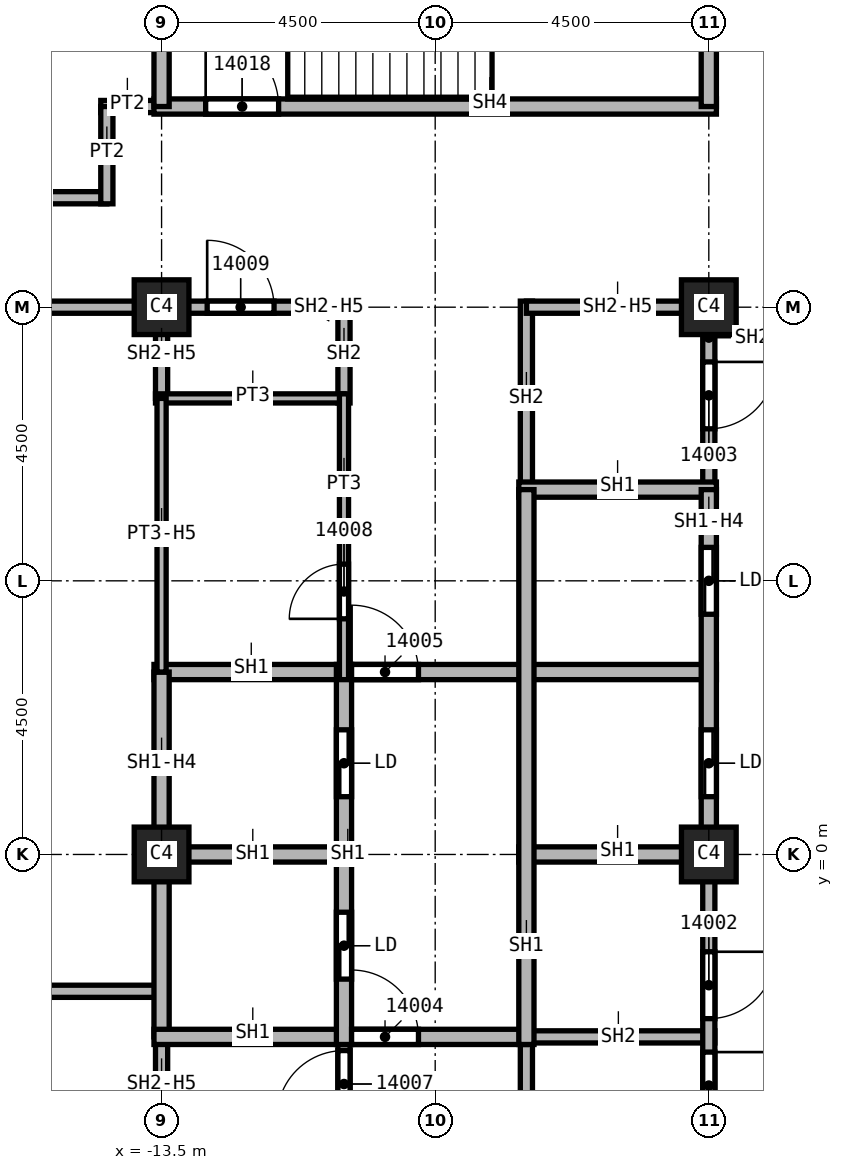
"""IFC4 building model, lengths in metres.
Left out: names, types, materials, properties, quantities, classifications, styles, units other than length and angle.
Written with IfcOpenShell. Run it as: python <this file> out.ifc"""

import sys

from ifc_helpers import new_model, si_unit, direction, frame, frame_2d, origin, origin_2d, place, context, subcontext, project, spatial, rectangle, extrude, element, fill, save


model = new_model("IFC4")
c1 = context("Model", 3, precision=1e-05, world=origin(), true_north=direction((0.0, 1.0)))
c2 = subcontext(c1, "Body", "Model", "MODEL_VIEW")
j1 = project(units=[si_unit("LENGTHUNIT", "METRE"), si_unit("PLANEANGLEUNIT", "RADIAN")], contexts=[c1])
p1 = place(None, origin())
s1 = spatial("IfcSite", under=j1, at=p1, CompositionType="ELEMENT")
p2 = place(p1, origin())
s2 = spatial("IfcBuilding", under=s1, at=p2, CompositionType="ELEMENT")
p3 = place(p2, frame((0.0, 0.0, 224.0)))
s3 = spatial("IfcBuildingStorey", under=s2, at=p3, CompositionType="ELEMENT", Elevation=224.0)
for number, where, z_axis, x_axis in (
    (1, (-4.5, 0.0, 0.0), (0.0, 0.0, 1.0), (1.0, 0.0, 0.0)),
    (2, (-4.5, 9.0, 0.0), (0.0, 0.0, 1.0), (1.0, 0.0, 0.0)),
    (3, (-13.5, 0.0, 0.0), (0.0, 0.0, 1.0), (1.0, 0.0, 0.0)),
    (4, (-13.5, 9.0, 0.0), (0.0, 0.0, 1.0), (1.0, 0.0, 0.0)),
):
    element("IfcColumn", number, at=place(p3, frame(where, z_axis=z_axis, x_axis=x_axis)), inside=s3, PredefinedType="COLUMN", context=c2, shape_type="SweptSolid", body=[
        extrude(rectangle(XDim=0.9, YDim=0.9, at=origin_2d()), origin(), (0.0, 0.0, 1.0), 3.72),
    ])
p4 = place(p3, frame((-18.0, -2.25, 0.0), z_axis=(0.0, 0.0, 1.0), x_axis=(1.0, 0.0, 0.0)))
e5 = element("IfcWall", 5, at=p4, inside=s3, PredefinedType="PARTITIONING", context=c2, shape_type="SweptSolid", body=[
    extrude(rectangle(XDim=4.5, YDim=0.2, at=frame_2d((2.25, 0.0))), origin(), (0.0, 0.0, 1.0), 3.72),
])
p5 = place(p3, frame((-18.0, 10.8, 0.0), z_axis=(0.0, 0.0, 1.0), x_axis=(1.0, 0.0, 0.0)))
e6 = element("IfcWall", 6, at=p5, inside=s3, PredefinedType="PARTITIONING", context=c2, shape_type="SweptSolid", body=[
    extrude(rectangle(XDim=3.6, YDim=0.2, at=frame_2d((1.8, 0.0))), origin(), (0.0, 0.0, 1.0), 3.72),
])
p6 = place(p5, frame((0.25, 0.0, 0.0)))
e7 = element("IfcOpeningElement", 7, at=p6, cuts=e6, PredefinedType="OPENING", context=c2, shape_type="SweptSolid", body=[
    extrude(rectangle(XDim=1.0, YDim=2.1, at=frame_2d((0.5, 1.05))), frame((0.0, 0.1, 0.0), z_axis=(0.0, -1.0, 0.0), x_axis=(1.0, 0.0, 0.0)), (0.0, 0.0, 1.0), 0.2),
])
p7 = place(p3, frame((-14.5, 12.3, 0.0), z_axis=(0.0, 0.0, 1.0), x_axis=(1.0, 0.0, 0.0)))
e8 = element("IfcWall", 8, at=p7, inside=s3, PredefinedType="PARTITIONING", context=c2, shape_type="SweptSolid", body=[
    extrude(rectangle(XDim=1.125, YDim=0.2, at=frame_2d((0.562, 0.0))), origin(), (0.0, 0.0, 1.0), 3.72),
])
p8 = place(p3, frame((-13.5, 9.0, 0.0), z_axis=(0.0, 0.0, 1.0), x_axis=(-1.0, 0.0, 0.0)))
e9 = element("IfcWall", 9, at=p8, inside=s3, PredefinedType="PARTITIONING", context=c2, shape_type="SweptSolid", body=[
    extrude(rectangle(XDim=4.5, YDim=0.2, at=frame_2d((2.25, 0.0))), origin(), (0.0, 0.0, 1.0), 3.72),
])
p9 = place(p3, frame((-14.4, 10.7, 0.0), z_axis=(0.0, 0.0, 1.0), x_axis=(0.0, 1.0, 0.0)))
e10 = element("IfcWall", 10, at=p9, inside=s3, PredefinedType="PARTITIONING", context=c2, shape_type="SweptSolid", body=[
    extrude(rectangle(XDim=1.6, YDim=0.2, at=frame_2d((0.8, 0.0))), origin(), (0.0, 0.0, 1.0), 3.72),
])
p10 = place(p3, frame((-13.6, 9.0, 0.0), z_axis=(0.0, 0.0, 1.0), x_axis=(1.0, 0.0, 0.0)))
e11 = element("IfcWall", 11, at=p10, inside=s3, PredefinedType="SOLIDWALL", context=c2, shape_type="SweptSolid", body=[
    extrude(rectangle(XDim=3.1, YDim=0.2, at=frame_2d((1.55, 0.0))), origin(), (0.0, 0.0, 1.0), 2.958),
])
p11 = place(p10, frame((0.85, 0.0, 0.0)))
e12 = element("IfcOpeningElement", 12, at=p11, cuts=e11, PredefinedType="OPENING", context=c2, shape_type="SweptSolid", body=[
    extrude(rectangle(XDim=1.1, YDim=2.1, at=frame_2d((0.55, 1.05))), frame((0.0, 0.1, 0.0), z_axis=(0.0, -1.0, 0.0), x_axis=(1.0, 0.0, 0.0)), (0.0, 0.0, 1.0), 0.2),
])
p12 = place(p3, frame((-13.5, -4.5, 0.0), z_axis=(0.0, 0.0, 1.0), x_axis=(0.0, 1.0, 0.0)))
e13 = element("IfcWall", 13, at=p12, inside=s3, PredefinedType="SOLIDWALL", context=c2, shape_type="SweptSolid", body=[
    extrude(rectangle(XDim=1.5, YDim=0.2, at=frame_2d((0.75, 0.0))), origin(), (0.0, 0.0, 1.0), 2.958),
])
p13 = place(p3, frame((-13.5, 7.5, 0.0), z_axis=(0.0, 0.0, 1.0), x_axis=(0.0, 1.0, 0.0)))
e14 = element("IfcWall", 14, at=p13, inside=s3, PredefinedType="SOLIDWALL", context=c2, shape_type="SweptSolid", body=[
    extrude(rectangle(XDim=1.6, YDim=0.2, at=frame_2d((0.8, 0.0))), origin(), (0.0, 0.0, 1.0), 2.958),
])
p14 = place(p3, frame((-10.5, -4.575, 0.0), z_axis=(0.0, 0.0, 1.0), x_axis=(0.0, 1.0, 0.0)))
e15 = element("IfcWall", 15, at=p14, inside=s3, PredefinedType="SOLIDWALL", context=c2, shape_type="SweptSolid", body=[
    extrude(rectangle(XDim=1.7, YDim=0.2, at=frame_2d((0.85, 0.0))), origin(), (0.0, 0.0, 1.0), 3.72),
])
p15 = place(p14, frame((0.25, 0.0, 0.0)))
e16 = element("IfcOpeningElement", 16, at=p15, cuts=e15, PredefinedType="OPENING", context=c2, shape_type="SweptSolid", body=[
    extrude(rectangle(XDim=1.1, YDim=2.1, at=frame_2d((0.55, 1.05))), frame((0.0, 0.1, 0.0), z_axis=(0.0, -1.0, 0.0), x_axis=(1.0, 0.0, 0.0)), (0.0, 0.0, 1.0), 0.2),
])
p16 = place(p3, frame((-10.5, 7.425, 0.0), z_axis=(0.0, 0.0, 1.0), x_axis=(0.0, 1.0, 0.0)))
e17 = element("IfcWall", 17, at=p16, inside=s3, PredefinedType="SOLIDWALL", context=c2, shape_type="SweptSolid", body=[
    extrude(rectangle(XDim=1.675, YDim=0.2, at=frame_2d((0.837, 0.0))), origin(), (0.0, 0.0, 1.0), 3.72),
])
p17 = place(p3, frame((-7.625, -3.0, 0.0), z_axis=(0.0, 0.0, 1.0), x_axis=(1.0, 0.0, 0.0)))
e18 = element("IfcWall", 18, at=p17, inside=s3, PredefinedType="SOLIDWALL", context=c2, shape_type="SweptSolid", body=[
    extrude(rectangle(XDim=3.225, YDim=0.2, at=frame_2d((1.613, 0.0))), origin(), (0.0, 0.0, 1.0), 3.72),
])
p18 = place(p3, frame((-7.5, -9.1, 0.0), z_axis=(0.0, 0.0, 1.0), x_axis=(0.0, 1.0, 0.0)))
e19 = element("IfcWall", 19, at=p18, inside=s3, PredefinedType="SOLIDWALL", context=c2, shape_type="SweptSolid", body=[
    extrude(rectangle(XDim=6.225, YDim=0.2, at=frame_2d((3.113, 0.0))), origin(), (0.0, 0.0, 1.0), 3.72),
])
p19 = place(p3, frame((-7.5, 6.0, 0.0), z_axis=(0.0, 0.0, 1.0), x_axis=(0.0, 1.0, 0.0)))
e20 = element("IfcWall", 20, at=p19, inside=s3, PredefinedType="SOLIDWALL", context=c2, shape_type="SweptSolid", body=[
    extrude(rectangle(XDim=3.1, YDim=0.2, at=frame_2d((1.55, 0.0))), origin(), (0.0, 0.0, 1.0), 3.72),
])
p20 = place(p3, frame((-7.5, 9.0, 0.0), z_axis=(0.0, 0.0, 1.0), x_axis=(1.0, 0.0, 0.0)))
e21 = element("IfcWall", 21, at=p20, inside=s3, PredefinedType="SOLIDWALL", context=c2, shape_type="SweptSolid", body=[
    extrude(rectangle(XDim=3.0, YDim=0.2, at=frame_2d((1.5, 0.0))), origin(), (0.0, 0.0, 1.0), 2.958),
])
p21 = place(p3, frame((-4.5, 0.0, 0.0), z_axis=(0.0, 0.0, 1.0), x_axis=(0.0, -1.0, 0.0)))
e22 = element("IfcWall", 22, at=p21, inside=s3, PredefinedType="SOLIDWALL", context=c2, shape_type="SweptSolid", body=[
    extrude(rectangle(XDim=9.1, YDim=0.2, at=frame_2d((4.55, 0.0))), origin(), (0.0, 0.0, 1.0), 2.958),
])
p22 = place(p21, frame((3.25, 0.0, 0.0)))
e23 = element("IfcOpeningElement", 23, at=p22, cuts=e22, PredefinedType="OPENING", context=c2, shape_type="SweptSolid", body=[
    extrude(rectangle(XDim=1.1, YDim=2.1, at=frame_2d((0.55, 1.05))), frame((0.0, 0.1, 0.0), z_axis=(0.0, -1.0, 0.0), x_axis=(1.0, 0.0, 0.0)), (0.0, 0.0, 1.0), 0.2),
])
p23 = place(p21, frame((1.6, 0.0, 0.0)))
e24 = element("IfcOpeningElement", 24, at=p23, cuts=e22, PredefinedType="OPENING", context=c2, shape_type="SweptSolid", body=[
    extrude(rectangle(XDim=1.1, YDim=2.1, at=frame_2d((0.55, 1.05))), frame((0.0, 0.1, 0.0), z_axis=(0.0, -1.0, 0.0), x_axis=(1.0, 0.0, 0.0)), (0.0, 0.0, 1.0), 0.2),
])
p24 = place(p3, frame((-4.5, 9.1, 0.0), z_axis=(0.0, 0.0, 1.0), x_axis=(0.0, -1.0, 0.0)))
e25 = element("IfcWall", 25, at=p24, inside=s3, PredefinedType="SOLIDWALL", context=c2, shape_type="SweptSolid", body=[
    extrude(rectangle(XDim=3.1, YDim=0.2, at=frame_2d((1.55, 0.0))), origin(), (0.0, 0.0, 1.0), 2.958),
])
p25 = place(p24, frame((1.0, 0.0, 0.0)))
e26 = element("IfcOpeningElement", 26, at=p25, cuts=e25, PredefinedType="OPENING", context=c2, shape_type="SweptSolid", body=[
    extrude(rectangle(XDim=1.1, YDim=2.1, at=frame_2d((0.55, 1.05))), frame((0.0, 0.1, 0.0), z_axis=(0.0, -1.0, 0.0), x_axis=(1.0, 0.0, 0.0)), (0.0, 0.0, 1.0), 0.2),
])
p26 = place(p3, frame((-13.625, 0.0, 0.0), z_axis=(0.0, 0.0, 1.0), x_axis=(1.0, 0.0, 0.0)))
e27 = element("IfcWall", 27, at=p26, inside=s3, PredefinedType="SOLIDWALL", context=c2, shape_type="SweptSolid", body=[
    extrude(rectangle(XDim=3.125, YDim=0.25, at=frame_2d((1.562, 0.0))), origin(), (0.0, 0.0, 1.0), 3.72),
])
p27 = place(p3, frame((-13.625, 3.0, 0.0), z_axis=(0.0, 0.0, 1.0), x_axis=(1.0, 0.0, 0.0)))
e28 = element("IfcWall", 28, at=p27, inside=s3, PredefinedType="SOLIDWALL", context=c2, shape_type="SweptSolid", body=[
    extrude(rectangle(XDim=9.25, YDim=0.25, at=frame_2d((4.625, 0.0))), origin(), (0.0, 0.0, 1.0), 3.72),
])
p28 = place(p27, frame((3.25, 0.0, 0.0)))
e29 = element("IfcOpeningElement", 29, at=p28, cuts=e28, PredefinedType="OPENING", context=c2, shape_type="SweptSolid", body=[
    extrude(rectangle(XDim=1.1, YDim=2.1, at=frame_2d((0.55, 1.05))), frame((0.0, 0.125, 0.0), z_axis=(0.0, -1.0, 0.0), x_axis=(1.0, 0.0, 0.0)), (0.0, 0.0, 1.0), 0.25),
])
p29 = place(p3, frame((-13.5, -3.0, 0.0), z_axis=(0.0, 0.0, 1.0), x_axis=(0.0, 1.0, 0.0)))
e30 = element("IfcWall", 30, at=p29, inside=s3, PredefinedType="SOLIDWALL", context=c2, shape_type="SweptSolid", body=[
    extrude(rectangle(XDim=6.0, YDim=0.25, at=frame_2d((3.0, 0.0))), origin(), (0.0, 0.0, 1.0), 2.958),
])
p30 = place(p3, frame((-13.625, -3.0, 0.0), z_axis=(0.0, 0.0, 1.0), x_axis=(1.0, 0.0, 0.0)))
e31 = element("IfcWall", 31, at=p30, inside=s3, PredefinedType="SOLIDWALL", context=c2, shape_type="SweptSolid", body=[
    extrude(rectangle(XDim=6.125, YDim=0.25, at=frame_2d((3.062, 0.0))), origin(), (0.0, 0.0, 1.0), 3.72),
])
p31 = place(p30, frame((3.25, 0.0, 0.0)))
e32 = element("IfcOpeningElement", 32, at=p31, cuts=e31, PredefinedType="OPENING", context=c2, shape_type="SweptSolid", body=[
    extrude(rectangle(XDim=1.1, YDim=2.1, at=frame_2d((0.55, 1.05))), frame((0.0, 0.125, 0.0), z_axis=(0.0, -1.0, 0.0), x_axis=(1.0, 0.0, 0.0)), (0.0, 0.0, 1.0), 0.25),
])
p32 = place(p3, frame((-10.5, -3.125, 0.0), z_axis=(0.0, 0.0, 1.0), x_axis=(0.0, 1.0, 0.0)))
e33 = element("IfcWall", 33, at=p32, inside=s3, PredefinedType="SOLIDWALL", context=c2, shape_type="SweptSolid", body=[
    extrude(rectangle(XDim=6.25, YDim=0.25, at=frame_2d((3.125, 0.0))), origin(), (0.0, 0.0, 1.0), 3.72),
])
p33 = place(p32, frame((1.075, 0.0, 0.0)))
e34 = element("IfcOpeningElement", 34, at=p33, cuts=e33, PredefinedType="OPENING", context=c2, shape_type="SweptSolid", body=[
    extrude(rectangle(XDim=1.1, YDim=2.1, at=frame_2d((0.55, 1.05))), frame((0.0, 0.125, 0.0), z_axis=(0.0, -1.0, 0.0), x_axis=(1.0, 0.0, 0.0)), (0.0, 0.0, 1.0), 0.25),
])
p34 = place(p32, frame((4.075, 0.0, 0.0)))
e35 = element("IfcOpeningElement", 35, at=p34, cuts=e33, PredefinedType="OPENING", context=c2, shape_type="SweptSolid", body=[
    extrude(rectangle(XDim=1.1, YDim=2.1, at=frame_2d((0.55, 1.05))), frame((0.0, 0.125, 0.0), z_axis=(0.0, -1.0, 0.0), x_axis=(1.0, 0.0, 0.0)), (0.0, 0.0, 1.0), 0.25),
])
for number, where, z_axis, x_axis in (
    (36, (-7.625, 0.0, 0.0), (0.0, 0.0, 1.0), (1.0, 0.0, 0.0)),
    (37, (-7.625, 6.0, 0.0), (0.0, 0.0, 1.0), (1.0, 0.0, 0.0)),
):
    element("IfcWall", number, at=place(p3, frame(where, z_axis=z_axis, x_axis=x_axis)), inside=s3, PredefinedType="SOLIDWALL", context=c2, shape_type="SweptSolid", body=[
        extrude(rectangle(XDim=3.25, YDim=0.25, at=frame_2d((1.625, 0.0))), origin(), (0.0, 0.0, 1.0), 3.72),
    ])
p35 = place(p3, frame((-7.5, -3.125, 0.0), z_axis=(0.0, 0.0, 1.0), x_axis=(0.0, 1.0, 0.0)))
e38 = element("IfcWall", 38, at=p35, inside=s3, PredefinedType="SOLIDWALL", context=c2, shape_type="SweptSolid", body=[
    extrude(rectangle(XDim=9.125, YDim=0.25, at=frame_2d((4.562, 0.0))), origin(), (0.0, 0.0, 1.0), 3.72),
])
p36 = place(p3, frame((-4.5, 6.0, 0.0), z_axis=(0.0, 0.0, 1.0), x_axis=(0.0, -1.0, 0.0)))
e39 = element("IfcWall", 39, at=p36, inside=s3, PredefinedType="SOLIDWALL", context=c2, shape_type="SweptSolid", body=[
    extrude(rectangle(XDim=6.0, YDim=0.25, at=frame_2d((3.0, 0.0))), origin(), (0.0, 0.0, 1.0), 2.958),
])
p37 = place(p36, frame((3.95, 0.0, 0.0)))
e40 = element("IfcOpeningElement", 40, at=p37, cuts=e39, PredefinedType="OPENING", context=c2, shape_type="SweptSolid", body=[
    extrude(rectangle(XDim=1.1, YDim=2.1, at=frame_2d((0.55, 1.05))), frame((0.0, 0.125, 0.0), z_axis=(0.0, -1.0, 0.0), x_axis=(1.0, 0.0, 0.0)), (0.0, 0.0, 1.0), 0.25),
])
p38 = place(p36, frame((0.95, 0.0, 0.0)))
e41 = element("IfcOpeningElement", 41, at=p38, cuts=e39, PredefinedType="OPENING", context=c2, shape_type="SweptSolid", body=[
    extrude(rectangle(XDim=1.1, YDim=2.1, at=frame_2d((0.55, 1.05))), frame((0.0, 0.125, 0.0), z_axis=(0.0, -1.0, 0.0), x_axis=(1.0, 0.0, 0.0)), (0.0, 0.0, 1.0), 0.25),
])
p39 = place(p3, frame((-13.625, 12.3, 0.0), z_axis=(0.0, 0.0, 1.0), x_axis=(1.0, 0.0, 0.0)))
e42 = element("IfcWall", 42, at=p39, inside=s3, PredefinedType="SOLIDWALL", context=c2, shape_type="SweptSolid", body=[
    extrude(rectangle(XDim=9.25, YDim=0.25, at=frame_2d((4.625, 0.0))), origin(), (0.0, 0.0, 1.0), 3.72),
])
p40 = place(p39, frame((0.85, 0.0, 0.0)))
e43 = element("IfcOpeningElement", 43, at=p40, cuts=e42, PredefinedType="OPENING", context=c2, shape_type="SweptSolid", body=[
    extrude(rectangle(XDim=1.2, YDim=2.1, at=frame_2d((0.6, 1.05))), frame((0.0, 0.125, 0.0), z_axis=(0.0, -1.0, 0.0), x_axis=(1.0, 0.0, 0.0)), (0.0, 0.0, 1.0), 0.25),
])
for number, where, z_axis, x_axis in (
    (44, (-13.5, 12.3, 0.0), (0.0, 0.0, 1.0), (0.0, 1.0, 0.0)),
    (45, (-4.5, 16.8, 0.0), (0.0, 0.0, 1.0), (0.0, -1.0, 0.0)),
):
    element("IfcWall", number, at=place(p3, frame(where, z_axis=z_axis, x_axis=x_axis)), inside=s3, PredefinedType="SOLIDWALL", context=c2, shape_type="SweptSolid", body=[
        extrude(rectangle(XDim=4.5, YDim=0.25, at=frame_2d((2.25, 0.0))), origin(), (0.0, 0.0, 1.0), 3.72),
    ])
p41 = place(p3, frame((-13.6, 7.5, 0.0), z_axis=(0.0, 0.0, 1.0), x_axis=(1.0, 0.0, 0.0)))
e46 = element("IfcWall", 46, at=p41, inside=s3, PredefinedType="PARTITIONING", context=c2, shape_type="SweptSolid", body=[
    extrude(rectangle(XDim=3.1, YDim=0.15, at=frame_2d((1.55, 0.0))), origin(), (0.0, 0.0, 1.0), 3.72),
])
p42 = place(p3, frame((-13.5, 3.0, 0.0), z_axis=(0.0, 0.0, 1.0), x_axis=(0.0, 1.0, 0.0)))
e47 = element("IfcWall", 47, at=p42, inside=s3, PredefinedType="PARTITIONING", context=c2, shape_type="SweptSolid", body=[
    extrude(rectangle(XDim=4.5, YDim=0.15, at=frame_2d((2.25, 0.0))), origin(), (0.0, 0.0, 1.0), 2.958),
])
p43 = place(p3, frame((-10.5, 2.875, 0.0), z_axis=(0.0, 0.0, 1.0), x_axis=(0.0, 1.0, 0.0)))
e48 = element("IfcWall", 48, at=p43, inside=s3, PredefinedType="PARTITIONING", context=c2, shape_type="SweptSolid", body=[
    extrude(rectangle(XDim=4.7, YDim=0.15, at=frame_2d((2.35, 0.0))), origin(), (0.0, 0.0, 1.0), 3.72),
])
p44 = place(p43, frame((1.0, 0.0, 0.0)))
e49 = element("IfcOpeningElement", 49, at=p44, cuts=e48, PredefinedType="OPENING", context=c2, shape_type="SweptSolid", body=[
    extrude(rectangle(XDim=0.9, YDim=2.1, at=frame_2d((0.45, 1.05))), frame((0.0, 0.075, 0.0), z_axis=(0.0, -1.0, 0.0), x_axis=(1.0, 0.0, 0.0)), (0.0, 0.0, 1.0), 0.15),
])
p45 = place(p22, origin())
e50 = element("IfcDoor", 50, at=p45, inside=s3, OperationType="SINGLE_SWING_RIGHT", PredefinedType="DOOR", context=c2, shape_type="SweptSolid", body=[
    extrude(rectangle(XDim=1.1, YDim=2.1, at=frame_2d((0.55, 1.05))), frame((0.0, 0.025, 0.0), z_axis=(0.0, -1.0, 0.0), x_axis=(1.0, 0.0, 0.0)), (0.0, 0.0, 1.0), 0.05),
])
fill(e23, e50)
p46 = place(p23, origin())
e51 = element("IfcDoor", 51, at=p46, inside=s3, OperationType="SINGLE_SWING_LEFT", PredefinedType="DOOR", context=c2, shape_type="SweptSolid", body=[
    extrude(rectangle(XDim=1.1, YDim=2.1, at=frame_2d((0.55, 1.05))), frame((0.0, 0.025, 0.0), z_axis=(0.0, -1.0, 0.0), x_axis=(1.0, 0.0, 0.0)), (0.0, 0.0, 1.0), 0.05),
])
fill(e24, e51)
p47 = place(p25, origin())
e52 = element("IfcDoor", 52, at=p47, inside=s3, OperationType="SINGLE_SWING_RIGHT", PredefinedType="DOOR", context=c2, shape_type="SweptSolid", body=[
    extrude(rectangle(XDim=1.1, YDim=2.1, at=frame_2d((0.55, 1.05))), frame((0.0, 0.025, 0.0), z_axis=(0.0, -1.0, 0.0), x_axis=(1.0, 0.0, 0.0)), (0.0, 0.0, 1.0), 0.05),
])
fill(e26, e52)
p48 = place(p31, origin())
e53 = element("IfcDoor", 53, at=p48, inside=s3, OperationType="SINGLE_SWING_LEFT", PredefinedType="DOOR", context=c2, shape_type="SweptSolid", body=[
    extrude(rectangle(XDim=1.1, YDim=2.1, at=frame_2d((0.55, 1.05))), frame((0.0, 0.025, 0.0), z_axis=(0.0, -1.0, 0.0), x_axis=(1.0, 0.0, 0.0)), (0.0, 0.0, 1.0), 0.05),
])
fill(e32, e53)
p49 = place(p28, origin())
e54 = element("IfcDoor", 54, at=p49, inside=s3, OperationType="SINGLE_SWING_RIGHT", PredefinedType="DOOR", context=c2, shape_type="SweptSolid", body=[
    extrude(rectangle(XDim=1.1, YDim=2.1, at=frame_2d((0.55, 1.05))), frame((0.0, 0.025, 0.0), z_axis=(0.0, -1.0, 0.0), x_axis=(1.0, 0.0, 0.0)), (0.0, 0.0, 1.0), 0.05),
])
fill(e29, e54)
p50 = place(p15, origin())
e55 = element("IfcDoor", 55, at=p50, inside=s3, OperationType="SINGLE_SWING_RIGHT", PredefinedType="DOOR", context=c2, shape_type="SweptSolid", body=[
    extrude(rectangle(XDim=1.1, YDim=2.1, at=frame_2d((0.55, 1.05))), frame((0.0, 0.025, 0.0), z_axis=(0.0, -1.0, 0.0), x_axis=(1.0, 0.0, 0.0)), (0.0, 0.0, 1.0), 0.05),
])
fill(e16, e55)
p51 = place(p44, origin())
e56 = element("IfcDoor", 56, at=p51, inside=s3, OperationType="SINGLE_SWING_LEFT", PredefinedType="DOOR", context=c2, shape_type="SweptSolid", body=[
    extrude(rectangle(XDim=0.9, YDim=2.1, at=frame_2d((0.45, 1.05))), frame((0.0, 0.025, 0.0), z_axis=(0.0, -1.0, 0.0), x_axis=(1.0, 0.0, 0.0)), (0.0, 0.0, 1.0), 0.05),
])
fill(e49, e56)
p52 = place(p11, origin())
e57 = element("IfcDoor", 57, at=p52, inside=s3, OperationType="SINGLE_SWING_RIGHT", PredefinedType="DOOR", context=c2, shape_type="SweptSolid", body=[
    extrude(rectangle(XDim=1.1, YDim=2.1, at=frame_2d((0.55, 1.05))), frame((0.0, 0.025, 0.0), z_axis=(0.0, -1.0, 0.0), x_axis=(1.0, 0.0, 0.0)), (0.0, 0.0, 1.0), 0.05),
])
fill(e12, e57)
p53 = place(p40, origin())
e58 = element("IfcDoor", 58, at=p53, inside=s3, OperationType="SINGLE_SWING_LEFT", PredefinedType="DOOR", context=c2, shape_type="SweptSolid", body=[
    extrude(rectangle(XDim=1.2, YDim=2.1, at=frame_2d((0.6, 1.05))), frame((0.0, 0.025, 0.0), z_axis=(0.0, -1.0, 0.0), x_axis=(1.0, 0.0, 0.0)), (0.0, 0.0, 1.0), 0.05),
])
fill(e43, e58)
p54 = place(p37, origin())
e59 = element("IfcDoor", 59, at=p54, inside=s3, OperationType="SLIDING_TO_LEFT", PredefinedType="DOOR", context=c2, shape_type="SweptSolid", body=[
    extrude(rectangle(XDim=1.1, YDim=2.1, at=frame_2d((0.55, 1.05))), frame((0.0, 0.025, 0.0), z_axis=(0.0, -1.0, 0.0), x_axis=(1.0, 0.0, 0.0)), (0.0, 0.0, 1.0), 0.05),
])
fill(e40, e59)
p55 = place(p38, origin())
e60 = element("IfcDoor", 60, at=p55, inside=s3, OperationType="SLIDING_TO_LEFT", PredefinedType="DOOR", context=c2, shape_type="SweptSolid", body=[
    extrude(rectangle(XDim=1.1, YDim=2.1, at=frame_2d((0.55, 1.05))), frame((0.0, 0.025, 0.0), z_axis=(0.0, -1.0, 0.0), x_axis=(1.0, 0.0, 0.0)), (0.0, 0.0, 1.0), 0.05),
])
fill(e41, e60)
p56 = place(p33, origin())
e61 = element("IfcDoor", 61, at=p56, inside=s3, OperationType="SLIDING_TO_LEFT", PredefinedType="DOOR", context=c2, shape_type="SweptSolid", body=[
    extrude(rectangle(XDim=1.1, YDim=2.1, at=frame_2d((0.55, 1.05))), frame((0.0, 0.025, 0.0), z_axis=(0.0, -1.0, 0.0), x_axis=(1.0, 0.0, 0.0)), (0.0, 0.0, 1.0), 0.05),
])
fill(e34, e61)
p57 = place(p34, origin())
e62 = element("IfcDoor", 62, at=p57, inside=s3, OperationType="SLIDING_TO_LEFT", PredefinedType="DOOR", context=c2, shape_type="SweptSolid", body=[
    extrude(rectangle(XDim=1.1, YDim=2.1, at=frame_2d((0.55, 1.05))), frame((0.0, 0.025, 0.0), z_axis=(0.0, -1.0, 0.0), x_axis=(1.0, 0.0, 0.0)), (0.0, 0.0, 1.0), 0.05),
])
fill(e35, e62)
save(model, sys.argv[1])
